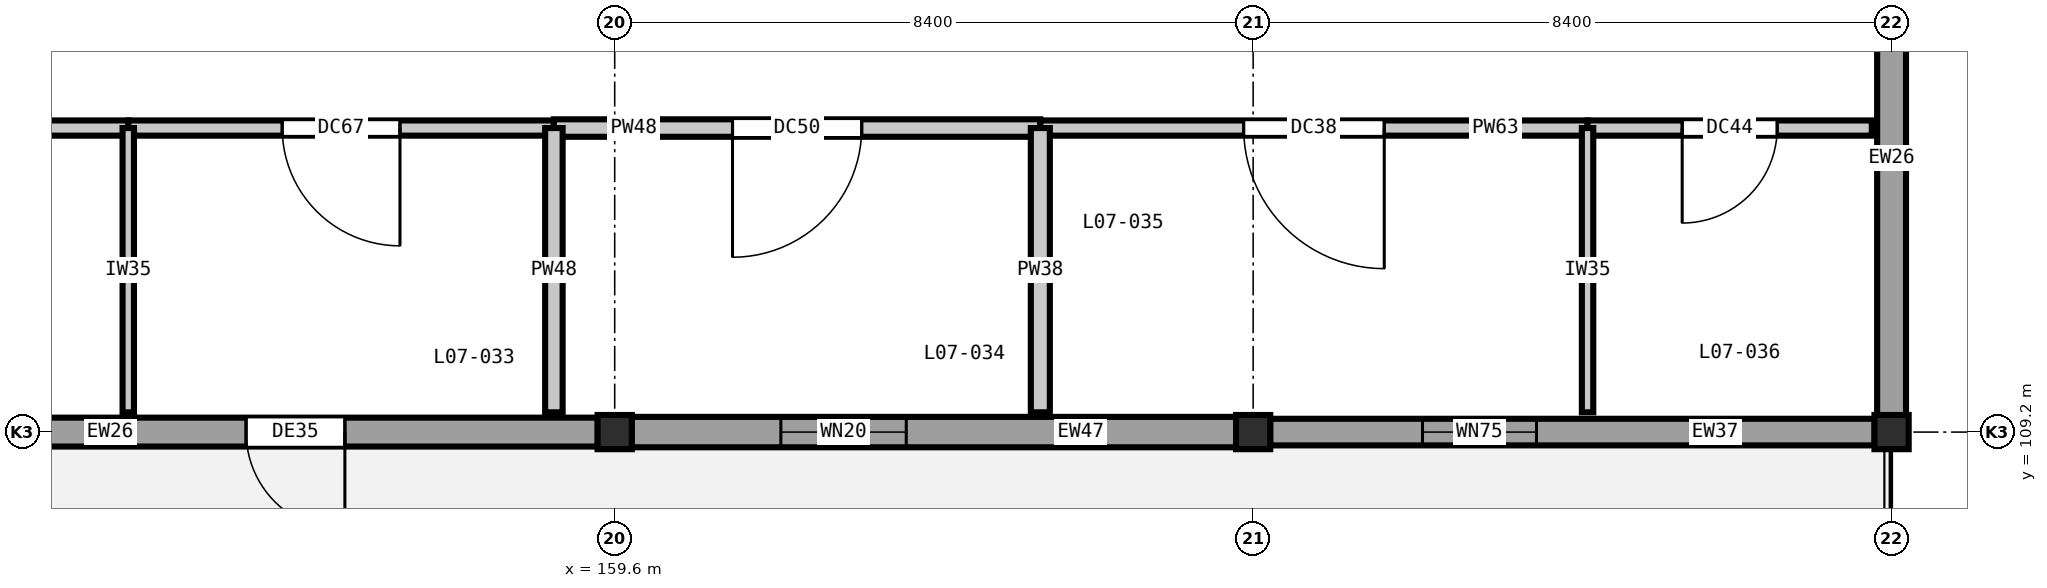
"""IFC4 building model, lengths in metres.
Left out: names, types, materials, properties, quantities, classifications, styles, units other than length and angle.
Written with IfcOpenShell. Run it as: python <this file> out.ifc"""

import sys

from ifc_helpers import new_model, si_unit, direction, frame, frame_2d, origin, origin_2d, place, context, subcontext, project, spatial, rectangle, extrude, element, fill, save


model = new_model("IFC4")
c1 = context("Model", 3, precision=1e-05, world=origin(), true_north=direction((0.0, 1.0)))
c2 = subcontext(c1, "Body", "Model", "MODEL_VIEW")
j1 = project(units=[si_unit("LENGTHUNIT", "METRE"), si_unit("PLANEANGLEUNIT", "RADIAN")], contexts=[c1])
p1 = place(None, origin())
s1 = spatial("IfcSite", under=j1, at=p1, CompositionType="ELEMENT")
p2 = place(p1, origin())
s2 = spatial("IfcBuilding", under=s1, at=p2, CompositionType="ELEMENT")
p3 = place(p2, frame((0.0, 0.0, 33.0)))
s3 = spatial("IfcBuildingStorey", under=s2, at=p3, CompositionType="ELEMENT", Elevation=33.0)
for number, where, z_axis, x_axis in (
    (1, (159.6, 109.2, 0.0), (0.0, 0.0, 1.0), (1.0, 0.0, 0.0)),
    (2, (168.0, 109.2, 0.0), (0.0, 0.0, 1.0), (1.0, 0.0, 0.0)),
    (3, (176.4, 109.2, 0.0), (0.0, 0.0, 1.0), (1.0, 0.0, 0.0)),
):
    element("IfcColumn", number, at=place(p3, frame(where, z_axis=z_axis, x_axis=x_axis)), inside=s3, PredefinedType="COLUMN", context=c2, shape_type="SweptSolid", body=[
        extrude(rectangle(XDim=0.45, YDim=0.45, at=origin_2d()), origin(), (0.0, 0.0, 1.0), 4.2),
    ])
p4 = place(p3, frame((176.4, 116.177, 0.0), z_axis=(0.0, 0.0, 1.0), x_axis=(0.0, -1.0, 0.0)))
e4 = element("IfcWall", 4, at=p4, inside=s3, PredefinedType="SOLIDWALL", context=c2, shape_type="SweptSolid", body=[
    extrude(rectangle(XDim=6.754, YDim=0.38, at=frame_2d((3.377, 0.0))), origin(), (0.0, 0.0, 1.0), 3.48),
])
p5 = place(p3, frame((176.177, 109.2, 0.0), z_axis=(0.0, 0.0, 1.0), x_axis=(-1.0, 0.0, 0.0)))
e5 = element("IfcWall", 5, at=p5, inside=s3, PredefinedType="SOLIDWALL", context=c2, shape_type="SweptSolid", body=[
    extrude(rectangle(XDim=7.954, YDim=0.35, at=frame_2d((3.977, 0.0))), origin(), (0.0, 0.0, 1.0), 3.48),
])
p6 = place(p5, frame((4.449, 0.0, 0.9)))
e6 = element("IfcOpeningElement", 6, at=p6, cuts=e5, PredefinedType="OPENING", context=c2, shape_type="SweptSolid", body=[
    extrude(rectangle(XDim=1.5, YDim=1.55, at=frame_2d((0.75, 0.775))), frame((0.0, 0.185, 0.0), z_axis=(0.0, -1.0, 0.0), x_axis=(1.0, 0.0, 0.0)), (0.0, 0.0, 1.0), 0.37),
])
p7 = place(p3, frame((167.777, 109.2, 0.0), z_axis=(0.0, 0.0, 1.0), x_axis=(-1.0, 0.0, 0.0)))
e7 = element("IfcWall", 7, at=p7, inside=s3, PredefinedType="SOLIDWALL", context=c2, shape_type="SweptSolid", body=[
    extrude(rectangle(XDim=7.954, YDim=0.4, at=frame_2d((3.977, 0.0))), origin(), (0.0, 0.0, 1.0), 3.48),
])
p8 = place(p7, frame((4.341, 0.0, 0.9)))
e8 = element("IfcOpeningElement", 8, at=p8, cuts=e7, PredefinedType="OPENING", context=c2, shape_type="SweptSolid", body=[
    extrude(rectangle(XDim=1.65, YDim=1.55, at=frame_2d((0.825, 0.775))), frame((0.0, 0.21, 0.0), z_axis=(0.0, -1.0, 0.0), x_axis=(1.0, 0.0, 0.0)), (0.0, 0.0, 1.0), 0.42),
])
p9 = place(p3, frame((159.377, 109.2, 0.0), z_axis=(0.0, 0.0, 1.0), x_axis=(-1.0, 0.0, 0.0)))
e9 = element("IfcWall", 9, at=p9, inside=s3, PredefinedType="SOLIDWALL", context=c2, shape_type="SweptSolid", body=[
    extrude(rectangle(XDim=7.954, YDim=0.38, at=frame_2d((3.977, 0.0))), origin(), (0.0, 0.0, 1.0), 3.48),
])
p10 = place(p9, frame((3.327, 0.0, 0.0)))
e10 = element("IfcOpeningElement", 10, at=p10, cuts=e9, PredefinedType="OPENING", context=c2, shape_type="SweptSolid", body=[
    extrude(rectangle(XDim=1.3, YDim=2.15, at=frame_2d((0.65, 1.075))), frame((0.0, 0.2, 0.0), z_axis=(0.0, -1.0, 0.0), x_axis=(1.0, 0.0, 0.0)), (0.0, 0.0, 1.0), 0.4),
])
p11 = place(p3, frame((144.4, 113.2, 0.0), z_axis=(0.0, 0.0, 1.0), x_axis=(1.0, 0.0, 0.0)))
e11 = element("IfcWall", 11, at=p11, inside=s3, PredefinedType="PARTITIONING", context=c2, shape_type="SweptSolid", body=[
    extrude(rectangle(XDim=8.8, YDim=0.2, at=frame_2d((4.4, 0.0))), origin(), (0.0, 0.0, 1.0), 3.92),
])
p12 = place(p11, frame((3.675, 0.0, 0.0)))
e12 = element("IfcOpeningElement", 12, at=p12, cuts=e11, PredefinedType="OPENING", context=c2, shape_type="SweptSolid", body=[
    extrude(rectangle(XDim=1.45, YDim=2.25, at=frame_2d((0.725, 1.125))), frame((0.0, 0.11, 0.0), z_axis=(0.0, -1.0, 0.0), x_axis=(1.0, 0.0, 0.0)), (0.0, 0.0, 1.0), 0.22),
])
p13 = place(p3, frame((153.2, 113.2, 0.0), z_axis=(0.0, 0.0, 1.0), x_axis=(1.0, 0.0, 0.0)))
e13 = element("IfcWall", 13, at=p13, inside=s3, PredefinedType="PARTITIONING", context=c2, shape_type="SweptSolid", body=[
    extrude(rectangle(XDim=5.6, YDim=0.2, at=frame_2d((2.8, 0.0))), origin(), (0.0, 0.0, 1.0), 3.92),
])
p14 = place(p13, frame((2.025, 0.0, 0.0)))
e14 = element("IfcOpeningElement", 14, at=p14, cuts=e13, PredefinedType="OPENING", context=c2, shape_type="SweptSolid", body=[
    extrude(rectangle(XDim=1.55, YDim=2.25, at=frame_2d((0.775, 1.125))), frame((0.0, 0.11, 0.0), z_axis=(0.0, -1.0, 0.0), x_axis=(1.0, 0.0, 0.0)), (0.0, 0.0, 1.0), 0.22),
])
p15 = place(p3, frame((158.8, 113.2, 0.0), z_axis=(0.0, 0.0, 1.0), x_axis=(1.0, 0.0, 0.0)))
e15 = element("IfcWall", 15, at=p15, inside=s3, PredefinedType="PARTITIONING", context=c2, shape_type="SweptSolid", body=[
    extrude(rectangle(XDim=6.4, YDim=0.23, at=frame_2d((3.2, 0.0))), origin(), (0.0, 0.0, 1.0), 3.92),
])
p16 = place(p15, frame((2.35, 0.0, 0.0)))
e16 = element("IfcOpeningElement", 16, at=p16, cuts=e15, PredefinedType="OPENING", context=c2, shape_type="SweptSolid", body=[
    extrude(rectangle(XDim=1.7, YDim=2.3, at=frame_2d((0.85, 1.15))), frame((0.0, 0.125, 0.0), z_axis=(0.0, -1.0, 0.0), x_axis=(1.0, 0.0, 0.0)), (0.0, 0.0, 1.0), 0.25),
])
p17 = place(p3, frame((165.2, 113.2, 0.0), z_axis=(0.0, 0.0, 1.0), x_axis=(1.0, 0.0, 0.0)))
e17 = element("IfcWall", 17, at=p17, inside=s3, PredefinedType="PARTITIONING", context=c2, shape_type="SweptSolid", body=[
    extrude(rectangle(XDim=7.2, YDim=0.2, at=frame_2d((3.6, 0.0))), origin(), (0.0, 0.0, 1.0), 3.92),
])
p18 = place(p17, frame((2.675, 0.0, 0.0)))
e18 = element("IfcOpeningElement", 18, at=p18, cuts=e17, PredefinedType="OPENING", context=c2, shape_type="SweptSolid", body=[
    extrude(rectangle(XDim=1.85, YDim=2.3, at=frame_2d((0.925, 1.15))), frame((0.0, 0.11, 0.0), z_axis=(0.0, -1.0, 0.0), x_axis=(1.0, 0.0, 0.0)), (0.0, 0.0, 1.0), 0.22),
])
p19 = place(p3, frame((172.4, 113.2, 0.0), z_axis=(0.0, 0.0, 1.0), x_axis=(1.0, 0.0, 0.0)))
e19 = element("IfcWall", 19, at=p19, inside=s3, PredefinedType="PARTITIONING", context=c2, shape_type="SweptSolid", body=[
    extrude(rectangle(XDim=3.74, YDim=0.2, at=frame_2d((1.87, 0.0))), origin(), (0.0, 0.0, 1.0), 3.92),
])
p20 = place(p19, frame((1.245, 0.0, 0.0)))
e20 = element("IfcOpeningElement", 20, at=p20, cuts=e19, PredefinedType="OPENING", context=c2, shape_type="SweptSolid", body=[
    extrude(rectangle(XDim=1.25, YDim=2.15, at=frame_2d((0.625, 1.075))), frame((0.0, 0.11, 0.0), z_axis=(0.0, -1.0, 0.0), x_axis=(1.0, 0.0, 0.0)), (0.0, 0.0, 1.0), 0.22),
])
p21 = place(p3, frame((153.2, 109.46, 0.0), z_axis=(0.0, 0.0, 1.0), x_axis=(0.0, 1.0, 0.0)))
e21 = element("IfcWall", 21, at=p21, inside=s3, PredefinedType="PARTITIONING", context=c2, shape_type="SweptSolid", body=[
    extrude(rectangle(XDim=3.74, YDim=0.15, at=frame_2d((1.87, 0.0))), origin(), (0.0, 0.0, 1.0), 3.92),
])
p22 = place(p3, frame((158.8, 109.46, 0.0), z_axis=(0.0, 0.0, 1.0), x_axis=(0.0, 1.0, 0.0)))
e22 = element("IfcWall", 22, at=p22, inside=s3, PredefinedType="PARTITIONING", context=c2, shape_type="SweptSolid", body=[
    extrude(rectangle(XDim=3.74, YDim=0.23, at=frame_2d((1.87, 0.0))), origin(), (0.0, 0.0, 1.0), 3.92),
])
p23 = place(p3, frame((165.2, 109.46, 0.0), z_axis=(0.0, 0.0, 1.0), x_axis=(0.0, 1.0, 0.0)))
e23 = element("IfcWall", 23, at=p23, inside=s3, PredefinedType="PARTITIONING", context=c2, shape_type="SweptSolid", body=[
    extrude(rectangle(XDim=3.74, YDim=0.25, at=frame_2d((1.87, 0.0))), origin(), (0.0, 0.0, 1.0), 3.92),
])
p24 = place(p3, frame((172.4, 109.46, 0.0), z_axis=(0.0, 0.0, 1.0), x_axis=(0.0, 1.0, 0.0)))
e24 = element("IfcWall", 24, at=p24, inside=s3, PredefinedType="PARTITIONING", context=c2, shape_type="SweptSolid", body=[
    extrude(rectangle(XDim=3.74, YDim=0.15, at=frame_2d((1.87, 0.0))), origin(), (0.0, 0.0, 1.0), 3.92),
])
p25 = place(p6, origin())
e25 = element("IfcWindow", 25, at=p25, inside=s3, PartitioningType="SINGLE_PANEL", PredefinedType="WINDOW", context=c2, shape_type="SweptSolid", body=[
    extrude(rectangle(XDim=1.5, YDim=1.55, at=frame_2d((0.75, 0.775))), frame((0.0, 0.03, 0.0), z_axis=(0.0, -1.0, 0.0), x_axis=(1.0, 0.0, 0.0)), (0.0, 0.0, 1.0), 0.06),
])
fill(e6, e25)
p26 = place(p8, origin())
e26 = element("IfcWindow", 26, at=p26, inside=s3, PartitioningType="DOUBLE_PANEL_VERTICAL", PredefinedType="WINDOW", context=c2, shape_type="SweptSolid", body=[
    extrude(rectangle(XDim=1.65, YDim=1.55, at=frame_2d((0.825, 0.775))), frame((0.0, 0.03, 0.0), z_axis=(0.0, -1.0, 0.0), x_axis=(1.0, 0.0, 0.0)), (0.0, 0.0, 1.0), 0.06),
])
fill(e8, e26)
p27 = place(p10, origin())
e27 = element("IfcDoor", 27, at=p27, inside=s3, OperationType="SINGLE_SWING_LEFT", PredefinedType="DOOR", context=c2, shape_type="SweptSolid", body=[
    extrude(rectangle(XDim=1.3, YDim=2.15, at=frame_2d((0.65, 1.075))), frame((0.0, 0.025, 0.0), z_axis=(0.0, -1.0, 0.0), x_axis=(1.0, 0.0, 0.0)), (0.0, 0.0, 1.0), 0.05),
])
fill(e10, e27)
p28 = place(p14, frame((1.55, 0.0, 0.0), z_axis=(0.0, 0.0, 1.0), x_axis=(-1.0, 0.0, 0.0)))
e28 = element("IfcDoor", 28, at=p28, inside=s3, OperationType="SINGLE_SWING_LEFT", PredefinedType="DOOR", context=c2, shape_type="SweptSolid", body=[
    extrude(rectangle(XDim=1.55, YDim=2.25, at=frame_2d((0.775, 1.125))), frame((0.0, 0.025, 0.0), z_axis=(0.0, -1.0, 0.0), x_axis=(1.0, 0.0, 0.0)), (0.0, 0.0, 1.0), 0.05),
])
fill(e14, e28)
p29 = place(p16, frame((1.7, 0.0, 0.0), z_axis=(0.0, 0.0, 1.0), x_axis=(-1.0, 0.0, 0.0)))
e29 = element("IfcDoor", 29, at=p29, inside=s3, OperationType="SINGLE_SWING_RIGHT", PredefinedType="DOOR", context=c2, shape_type="SweptSolid", body=[
    extrude(rectangle(XDim=1.7, YDim=2.3, at=frame_2d((0.85, 1.15))), frame((0.0, 0.025, 0.0), z_axis=(0.0, -1.0, 0.0), x_axis=(1.0, 0.0, 0.0)), (0.0, 0.0, 1.0), 0.05),
])
fill(e16, e29)
p30 = place(p18, frame((1.85, 0.0, 0.0), z_axis=(0.0, 0.0, 1.0), x_axis=(-1.0, 0.0, 0.0)))
e30 = element("IfcDoor", 30, at=p30, inside=s3, OperationType="SINGLE_SWING_LEFT", PredefinedType="DOOR", context=c2, shape_type="SweptSolid", body=[
    extrude(rectangle(XDim=1.85, YDim=2.3, at=frame_2d((0.925, 1.15))), frame((0.0, 0.025, 0.0), z_axis=(0.0, -1.0, 0.0), x_axis=(1.0, 0.0, 0.0)), (0.0, 0.0, 1.0), 0.05),
])
fill(e18, e30)
p31 = place(p20, frame((1.25, 0.0, 0.0), z_axis=(0.0, 0.0, 1.0), x_axis=(-1.0, 0.0, 0.0)))
e31 = element("IfcDoor", 31, at=p31, inside=s3, OperationType="SINGLE_SWING_RIGHT", PredefinedType="DOOR", context=c2, shape_type="SweptSolid", body=[
    extrude(rectangle(XDim=1.25, YDim=2.15, at=frame_2d((0.625, 1.075))), frame((0.0, 0.025, 0.0), z_axis=(0.0, -1.0, 0.0), x_axis=(1.0, 0.0, 0.0)), (0.0, 0.0, 1.0), 0.05),
])
fill(e20, e31)
save(model, sys.argv[1])
